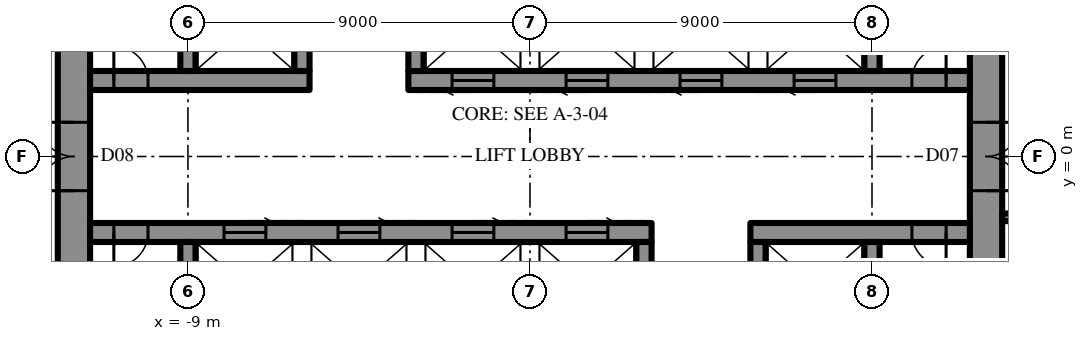
"""IFC4 building model, lengths in metres.
Left out: names, types, materials, properties, quantities, classifications, styles, units other than length and angle.
Written with IfcOpenShell. Run it as: python <this file> out.ifc"""

import sys

from ifc_helpers import new_model, si_unit, direction, frame, frame_2d, origin, place, context, subcontext, project, spatial, rectangle, extrude, element, fill, save


model = new_model("IFC4")
c1 = context("Model", 3, precision=1e-05, world=origin(), true_north=direction((0.0, 1.0)))
c2 = subcontext(c1, "Body", "Model", "MODEL_VIEW")
j1 = project(units=[si_unit("LENGTHUNIT", "METRE"), si_unit("PLANEANGLEUNIT", "RADIAN")], contexts=[c1])
p1 = place(None, origin())
s1 = spatial("IfcSite", under=j1, at=p1, CompositionType="ELEMENT")
p2 = place(p1, origin())
s2 = spatial("IfcBuilding", under=s1, at=p2, CompositionType="ELEMENT")
p3 = place(p2, frame((0.0, 0.0, 378.7)))
s3 = spatial("IfcBuildingStorey", under=s2, at=p3, CompositionType="ELEMENT", Elevation=378.7)
p4 = place(p3, frame((12.0, -10.7, 0.0), z_axis=(0.0, 0.0, 1.0), x_axis=(0.0, 1.0, 0.0)))
e1 = element("IfcWall", 1, at=p4, inside=s3, PredefinedType="SHEAR", context=c2, shape_type="SweptSolid", body=[
    extrude(rectangle(XDim=21.4, YDim=0.85, at=frame_2d((10.7, 0.0))), origin(), (0.0, 0.0, 1.0), 4.2),
])
p5 = place(p4, frame((9.8, 0.0, 0.0)))
e2 = element("IfcOpeningElement", 2, at=p5, cuts=e1, PredefinedType="OPENING", context=c2, shape_type="SweptSolid", body=[
    extrude(rectangle(XDim=1.8, YDim=2.4, at=frame_2d((0.9, 1.2))), frame((0.0, 0.435, 0.0), z_axis=(0.0, -1.0, 0.0), x_axis=(1.0, 0.0, 0.0)), (0.0, 0.0, 1.0), 0.87),
])
p6 = place(p3, frame((-12.0, 10.7, 0.0), z_axis=(0.0, 0.0, 1.0), x_axis=(0.0, -1.0, 0.0)))
e3 = element("IfcWall", 3, at=p6, inside=s3, PredefinedType="SHEAR", context=c2, shape_type="SweptSolid", body=[
    extrude(rectangle(XDim=21.4, YDim=0.85, at=frame_2d((10.7, 0.0))), origin(), (0.0, 0.0, 1.0), 4.2),
])
p7 = place(p6, frame((9.8, 0.0, 0.0)))
e4 = element("IfcOpeningElement", 4, at=p7, cuts=e3, PredefinedType="OPENING", context=c2, shape_type="SweptSolid", body=[
    extrude(rectangle(XDim=1.8, YDim=2.4, at=frame_2d((0.9, 1.2))), frame((0.0, 0.435, 0.0), z_axis=(0.0, -1.0, 0.0), x_axis=(1.0, 0.0, 0.0)), (0.0, 0.0, 1.0), 0.87),
])
p8 = place(p3, frame((-11.575, 2.0, 0.0), z_axis=(0.0, 0.0, 1.0), x_axis=(1.0, 0.0, 0.0)))
e5 = element("IfcWall", 5, at=p8, inside=s3, PredefinedType="SHEAR", context=c2, shape_type="SweptSolid", body=[
    extrude(rectangle(XDim=5.775, YDim=0.5, at=frame_2d((2.887, 0.0))), origin(), (0.0, 0.0, 1.0), 4.2),
])
p9 = place(p8, frame((0.625, 0.0, 0.0)))
e6 = element("IfcOpeningElement", 6, at=p9, cuts=e5, PredefinedType="OPENING", context=c2, shape_type="SweptSolid", body=[
    extrude(rectangle(XDim=0.9, YDim=2.2, at=frame_2d((0.45, 1.1))), frame((0.0, 0.26, 0.0), z_axis=(0.0, -1.0, 0.0), x_axis=(1.0, 0.0, 0.0)), (0.0, 0.0, 1.0), 0.52),
])
p10 = place(p3, frame((-3.2, 2.0, 0.0), z_axis=(0.0, 0.0, 1.0), x_axis=(1.0, 0.0, 0.0)))
e7 = element("IfcWall", 7, at=p10, inside=s3, PredefinedType="SHEAR", context=c2, shape_type="SweptSolid", body=[
    extrude(rectangle(XDim=14.775, YDim=0.5, at=frame_2d((7.387, 0.0))), origin(), (0.0, 0.0, 1.0), 4.2),
])
p11 = place(p10, frame((13.25, 0.0, 0.0)))
e8 = element("IfcOpeningElement", 8, at=p11, cuts=e7, PredefinedType="OPENING", context=c2, shape_type="SweptSolid", body=[
    extrude(rectangle(XDim=0.9, YDim=2.2, at=frame_2d((0.45, 1.1))), frame((0.0, 0.26, 0.0), z_axis=(0.0, -1.0, 0.0), x_axis=(1.0, 0.0, 0.0)), (0.0, 0.0, 1.0), 0.52),
])
p12 = place(p10, frame((1.15, 0.0, 0.0)))
e9 = element("IfcOpeningElement", 9, at=p12, cuts=e7, PredefinedType="OPENING", context=c2, shape_type="SweptSolid", body=[
    extrude(rectangle(XDim=1.1, YDim=2.2, at=frame_2d((0.55, 1.1))), frame((0.0, 0.26, 0.0), z_axis=(0.0, -1.0, 0.0), x_axis=(1.0, 0.0, 0.0)), (0.0, 0.0, 1.0), 0.52),
])
p13 = place(p10, frame((4.15, 0.0, 0.0)))
e10 = element("IfcOpeningElement", 10, at=p13, cuts=e7, PredefinedType="OPENING", context=c2, shape_type="SweptSolid", body=[
    extrude(rectangle(XDim=1.1, YDim=2.2, at=frame_2d((0.55, 1.1))), frame((0.0, 0.26, 0.0), z_axis=(0.0, -1.0, 0.0), x_axis=(1.0, 0.0, 0.0)), (0.0, 0.0, 1.0), 0.52),
])
p14 = place(p10, frame((7.15, 0.0, 0.0)))
e11 = element("IfcOpeningElement", 11, at=p14, cuts=e7, PredefinedType="OPENING", context=c2, shape_type="SweptSolid", body=[
    extrude(rectangle(XDim=1.1, YDim=2.2, at=frame_2d((0.55, 1.1))), frame((0.0, 0.26, 0.0), z_axis=(0.0, -1.0, 0.0), x_axis=(1.0, 0.0, 0.0)), (0.0, 0.0, 1.0), 0.52),
])
p15 = place(p10, frame((10.15, 0.0, 0.0)))
e12 = element("IfcOpeningElement", 12, at=p15, cuts=e7, PredefinedType="OPENING", context=c2, shape_type="SweptSolid", body=[
    extrude(rectangle(XDim=1.1, YDim=2.2, at=frame_2d((0.55, 1.1))), frame((0.0, 0.26, 0.0), z_axis=(0.0, -1.0, 0.0), x_axis=(1.0, 0.0, 0.0)), (0.0, 0.0, 1.0), 0.52),
])
for number, where, z_axis, x_axis in (
    (13, (-9.0, 2.25, 0.0), (0.0, 0.0, 1.0), (0.0, 1.0, 0.0)),
    (14, (-6.0, 2.25, 0.0), (0.0, 0.0, 1.0), (0.0, 1.0, 0.0)),
    (15, (-3.0, 2.25, 0.0), (0.0, 0.0, 1.0), (0.0, 1.0, 0.0)),
    (16, (9.0, 2.25, 0.0), (0.0, 0.0, 1.0), (0.0, 1.0, 0.0)),
):
    element("IfcWall", number, at=place(p3, frame(where, z_axis=z_axis, x_axis=x_axis)), inside=s3, PredefinedType="SHEAR", context=c2, shape_type="SweptSolid", body=[
        extrude(rectangle(XDim=2.3, YDim=0.4, at=frame_2d((1.15, 0.0))), origin(), (0.0, 0.0, 1.0), 4.2),
    ])
p16 = place(p3, frame((11.575, -2.0, 0.0), z_axis=(0.0, 0.0, 1.0), x_axis=(-1.0, 0.0, 0.0)))
e17 = element("IfcWall", 17, at=p16, inside=s3, PredefinedType="SHEAR", context=c2, shape_type="SweptSolid", body=[
    extrude(rectangle(XDim=5.775, YDim=0.5, at=frame_2d((2.887, 0.0))), origin(), (0.0, 0.0, 1.0), 4.2),
])
p17 = place(p16, frame((0.625, 0.0, 0.0)))
e18 = element("IfcOpeningElement", 18, at=p17, cuts=e17, PredefinedType="OPENING", context=c2, shape_type="SweptSolid", body=[
    extrude(rectangle(XDim=0.9, YDim=2.2, at=frame_2d((0.45, 1.1))), frame((0.0, 0.26, 0.0), z_axis=(0.0, -1.0, 0.0), x_axis=(1.0, 0.0, 0.0)), (0.0, 0.0, 1.0), 0.52),
])
p18 = place(p3, frame((3.2, -2.0, 0.0), z_axis=(0.0, 0.0, 1.0), x_axis=(-1.0, 0.0, 0.0)))
e19 = element("IfcWall", 19, at=p18, inside=s3, PredefinedType="SHEAR", context=c2, shape_type="SweptSolid", body=[
    extrude(rectangle(XDim=14.775, YDim=0.5, at=frame_2d((7.387, 0.0))), origin(), (0.0, 0.0, 1.0), 4.2),
])
p19 = place(p18, frame((13.25, 0.0, 0.0)))
e20 = element("IfcOpeningElement", 20, at=p19, cuts=e19, PredefinedType="OPENING", context=c2, shape_type="SweptSolid", body=[
    extrude(rectangle(XDim=0.9, YDim=2.2, at=frame_2d((0.45, 1.1))), frame((0.0, 0.26, 0.0), z_axis=(0.0, -1.0, 0.0), x_axis=(1.0, 0.0, 0.0)), (0.0, 0.0, 1.0), 0.52),
])
p20 = place(p18, frame((1.15, 0.0, 0.0)))
e21 = element("IfcOpeningElement", 21, at=p20, cuts=e19, PredefinedType="OPENING", context=c2, shape_type="SweptSolid", body=[
    extrude(rectangle(XDim=1.1, YDim=2.2, at=frame_2d((0.55, 1.1))), frame((0.0, 0.26, 0.0), z_axis=(0.0, -1.0, 0.0), x_axis=(1.0, 0.0, 0.0)), (0.0, 0.0, 1.0), 0.52),
])
p21 = place(p18, frame((4.15, 0.0, 0.0)))
e22 = element("IfcOpeningElement", 22, at=p21, cuts=e19, PredefinedType="OPENING", context=c2, shape_type="SweptSolid", body=[
    extrude(rectangle(XDim=1.1, YDim=2.2, at=frame_2d((0.55, 1.1))), frame((0.0, 0.26, 0.0), z_axis=(0.0, -1.0, 0.0), x_axis=(1.0, 0.0, 0.0)), (0.0, 0.0, 1.0), 0.52),
])
p22 = place(p18, frame((7.15, 0.0, 0.0)))
e23 = element("IfcOpeningElement", 23, at=p22, cuts=e19, PredefinedType="OPENING", context=c2, shape_type="SweptSolid", body=[
    extrude(rectangle(XDim=1.1, YDim=2.2, at=frame_2d((0.55, 1.1))), frame((0.0, 0.26, 0.0), z_axis=(0.0, -1.0, 0.0), x_axis=(1.0, 0.0, 0.0)), (0.0, 0.0, 1.0), 0.52),
])
p23 = place(p18, frame((10.15, 0.0, 0.0)))
e24 = element("IfcOpeningElement", 24, at=p23, cuts=e19, PredefinedType="OPENING", context=c2, shape_type="SweptSolid", body=[
    extrude(rectangle(XDim=1.1, YDim=2.2, at=frame_2d((0.55, 1.1))), frame((0.0, 0.26, 0.0), z_axis=(0.0, -1.0, 0.0), x_axis=(1.0, 0.0, 0.0)), (0.0, 0.0, 1.0), 0.52),
])
for number, where, z_axis, x_axis in (
    (25, (9.0, -2.25, 0.0), (0.0, 0.0, 1.0), (0.0, -1.0, 0.0)),
    (26, (6.0, -2.25, 0.0), (0.0, 0.0, 1.0), (0.0, -1.0, 0.0)),
    (27, (3.0, -2.25, 0.0), (0.0, 0.0, 1.0), (0.0, -1.0, 0.0)),
    (28, (-9.0, -2.25, 0.0), (0.0, 0.0, 1.0), (0.0, -1.0, 0.0)),
):
    element("IfcWall", number, at=place(p3, frame(where, z_axis=z_axis, x_axis=x_axis)), inside=s3, PredefinedType="SHEAR", context=c2, shape_type="SweptSolid", body=[
        extrude(rectangle(XDim=2.3, YDim=0.4, at=frame_2d((1.15, 0.0))), origin(), (0.0, 0.0, 1.0), 4.2),
    ])
p24 = place(p3, frame((12.425, -1.6, 0.0), z_axis=(0.0, 0.0, 1.0), x_axis=(1.0, 0.0, 0.0)))
e29 = element("IfcWall", 29, at=p24, inside=s3, PredefinedType="PARTITIONING", context=c2, shape_type="SweptSolid", body=[
    extrude(rectangle(XDim=16.558, YDim=0.2, at=frame_2d((8.279, 0.0))), origin(), (0.0, 0.0, 1.0), 4.0),
])
p25 = place(p24, frame((1.156, 0.0, 0.0)))
e30 = element("IfcOpeningElement", 30, at=p25, cuts=e29, PredefinedType="OPENING", context=c2, shape_type="SweptSolid", body=[
    extrude(rectangle(XDim=1.0, YDim=2.2, at=frame_2d((0.5, 1.1))), frame((0.0, 0.11, 0.0), z_axis=(0.0, -1.0, 0.0), x_axis=(1.0, 0.0, 0.0)), (0.0, 0.0, 1.0), 0.22),
])
p26 = place(p5, frame((1.8, 0.0, 0.0), z_axis=(0.0, 0.0, 1.0), x_axis=(-1.0, 0.0, 0.0)))
e31 = element("IfcDoor", 31, at=p26, inside=s3, OperationType="DOUBLE_DOOR_SINGLE_SWING", PredefinedType="DOOR", context=c2, shape_type="SweptSolid", body=[
    extrude(rectangle(XDim=1.8, YDim=2.4, at=frame_2d((0.9, 1.2))), frame((0.0, 0.025, 0.0), z_axis=(0.0, -1.0, 0.0), x_axis=(1.0, 0.0, 0.0)), (0.0, 0.0, 1.0), 0.05),
])
fill(e2, e31)
p27 = place(p7, frame((1.8, 0.0, 0.0), z_axis=(0.0, 0.0, 1.0), x_axis=(-1.0, 0.0, 0.0)))
e32 = element("IfcDoor", 32, at=p27, inside=s3, OperationType="DOUBLE_DOOR_SINGLE_SWING", PredefinedType="DOOR", context=c2, shape_type="SweptSolid", body=[
    extrude(rectangle(XDim=1.8, YDim=2.4, at=frame_2d((0.9, 1.2))), frame((0.0, 0.025, 0.0), z_axis=(0.0, -1.0, 0.0), x_axis=(1.0, 0.0, 0.0)), (0.0, 0.0, 1.0), 0.05),
])
fill(e4, e32)
p28 = place(p9, origin())
e33 = element("IfcDoor", 33, at=p28, inside=s3, OperationType="SINGLE_SWING_RIGHT", PredefinedType="DOOR", context=c2, shape_type="SweptSolid", body=[
    extrude(rectangle(XDim=0.9, YDim=2.2, at=frame_2d((0.45, 1.1))), frame((0.0, 0.025, 0.0), z_axis=(0.0, -1.0, 0.0), x_axis=(1.0, 0.0, 0.0)), (0.0, 0.0, 1.0), 0.05),
])
fill(e6, e33)
p29 = place(p11, origin())
e34 = element("IfcDoor", 34, at=p29, inside=s3, OperationType="SINGLE_SWING_LEFT", PredefinedType="DOOR", context=c2, shape_type="SweptSolid", body=[
    extrude(rectangle(XDim=0.9, YDim=2.2, at=frame_2d((0.45, 1.1))), frame((0.0, 0.025, 0.0), z_axis=(0.0, -1.0, 0.0), x_axis=(1.0, 0.0, 0.0)), (0.0, 0.0, 1.0), 0.05),
])
fill(e8, e34)
p30 = place(p17, origin())
e35 = element("IfcDoor", 35, at=p30, inside=s3, OperationType="SINGLE_SWING_RIGHT", PredefinedType="DOOR", context=c2, shape_type="SweptSolid", body=[
    extrude(rectangle(XDim=0.9, YDim=2.2, at=frame_2d((0.45, 1.1))), frame((0.0, 0.025, 0.0), z_axis=(0.0, -1.0, 0.0), x_axis=(1.0, 0.0, 0.0)), (0.0, 0.0, 1.0), 0.05),
])
fill(e18, e35)
p31 = place(p19, origin())
e36 = element("IfcDoor", 36, at=p31, inside=s3, OperationType="SINGLE_SWING_LEFT", PredefinedType="DOOR", context=c2, shape_type="SweptSolid", body=[
    extrude(rectangle(XDim=0.9, YDim=2.2, at=frame_2d((0.45, 1.1))), frame((0.0, 0.025, 0.0), z_axis=(0.0, -1.0, 0.0), x_axis=(1.0, 0.0, 0.0)), (0.0, 0.0, 1.0), 0.05),
])
fill(e20, e36)
p32 = place(p12, frame((1.1, 0.0, 0.0), z_axis=(0.0, 0.0, 1.0), x_axis=(-1.0, 0.0, 0.0)))
e37 = element("IfcDoor", 37, at=p32, inside=s3, OperationType="SLIDING_TO_LEFT", PredefinedType="DOOR", context=c2, shape_type="SweptSolid", body=[
    extrude(rectangle(XDim=1.1, YDim=2.2, at=frame_2d((0.55, 1.1))), frame((0.0, 0.025, 0.0), z_axis=(0.0, -1.0, 0.0), x_axis=(1.0, 0.0, 0.0)), (0.0, 0.0, 1.0), 0.05),
])
fill(e9, e37)
p33 = place(p13, frame((1.1, 0.0, 0.0), z_axis=(0.0, 0.0, 1.0), x_axis=(-1.0, 0.0, 0.0)))
e38 = element("IfcDoor", 38, at=p33, inside=s3, OperationType="SLIDING_TO_LEFT", PredefinedType="DOOR", context=c2, shape_type="SweptSolid", body=[
    extrude(rectangle(XDim=1.1, YDim=2.2, at=frame_2d((0.55, 1.1))), frame((0.0, 0.025, 0.0), z_axis=(0.0, -1.0, 0.0), x_axis=(1.0, 0.0, 0.0)), (0.0, 0.0, 1.0), 0.05),
])
fill(e10, e38)
p34 = place(p14, frame((1.1, 0.0, 0.0), z_axis=(0.0, 0.0, 1.0), x_axis=(-1.0, 0.0, 0.0)))
e39 = element("IfcDoor", 39, at=p34, inside=s3, OperationType="SLIDING_TO_LEFT", PredefinedType="DOOR", context=c2, shape_type="SweptSolid", body=[
    extrude(rectangle(XDim=1.1, YDim=2.2, at=frame_2d((0.55, 1.1))), frame((0.0, 0.025, 0.0), z_axis=(0.0, -1.0, 0.0), x_axis=(1.0, 0.0, 0.0)), (0.0, 0.0, 1.0), 0.05),
])
fill(e11, e39)
p35 = place(p15, frame((1.1, 0.0, 0.0), z_axis=(0.0, 0.0, 1.0), x_axis=(-1.0, 0.0, 0.0)))
e40 = element("IfcDoor", 40, at=p35, inside=s3, OperationType="SLIDING_TO_LEFT", PredefinedType="DOOR", context=c2, shape_type="SweptSolid", body=[
    extrude(rectangle(XDim=1.1, YDim=2.2, at=frame_2d((0.55, 1.1))), frame((0.0, 0.025, 0.0), z_axis=(0.0, -1.0, 0.0), x_axis=(1.0, 0.0, 0.0)), (0.0, 0.0, 1.0), 0.05),
])
fill(e12, e40)
p36 = place(p20, frame((1.1, 0.0, 0.0), z_axis=(0.0, 0.0, 1.0), x_axis=(-1.0, 0.0, 0.0)))
e41 = element("IfcDoor", 41, at=p36, inside=s3, OperationType="SLIDING_TO_LEFT", PredefinedType="DOOR", context=c2, shape_type="SweptSolid", body=[
    extrude(rectangle(XDim=1.1, YDim=2.2, at=frame_2d((0.55, 1.1))), frame((0.0, 0.025, 0.0), z_axis=(0.0, -1.0, 0.0), x_axis=(1.0, 0.0, 0.0)), (0.0, 0.0, 1.0), 0.05),
])
fill(e21, e41)
p37 = place(p21, frame((1.1, 0.0, 0.0), z_axis=(0.0, 0.0, 1.0), x_axis=(-1.0, 0.0, 0.0)))
e42 = element("IfcDoor", 42, at=p37, inside=s3, OperationType="SLIDING_TO_LEFT", PredefinedType="DOOR", context=c2, shape_type="SweptSolid", body=[
    extrude(rectangle(XDim=1.1, YDim=2.2, at=frame_2d((0.55, 1.1))), frame((0.0, 0.025, 0.0), z_axis=(0.0, -1.0, 0.0), x_axis=(1.0, 0.0, 0.0)), (0.0, 0.0, 1.0), 0.05),
])
fill(e22, e42)
p38 = place(p22, frame((1.1, 0.0, 0.0), z_axis=(0.0, 0.0, 1.0), x_axis=(-1.0, 0.0, 0.0)))
e43 = element("IfcDoor", 43, at=p38, inside=s3, OperationType="SLIDING_TO_LEFT", PredefinedType="DOOR", context=c2, shape_type="SweptSolid", body=[
    extrude(rectangle(XDim=1.1, YDim=2.2, at=frame_2d((0.55, 1.1))), frame((0.0, 0.025, 0.0), z_axis=(0.0, -1.0, 0.0), x_axis=(1.0, 0.0, 0.0)), (0.0, 0.0, 1.0), 0.05),
])
fill(e23, e43)
p39 = place(p23, frame((1.1, 0.0, 0.0), z_axis=(0.0, 0.0, 1.0), x_axis=(-1.0, 0.0, 0.0)))
e44 = element("IfcDoor", 44, at=p39, inside=s3, OperationType="SLIDING_TO_LEFT", PredefinedType="DOOR", context=c2, shape_type="SweptSolid", body=[
    extrude(rectangle(XDim=1.1, YDim=2.2, at=frame_2d((0.55, 1.1))), frame((0.0, 0.025, 0.0), z_axis=(0.0, -1.0, 0.0), x_axis=(1.0, 0.0, 0.0)), (0.0, 0.0, 1.0), 0.05),
])
fill(e24, e44)
save(model, sys.argv[1])
